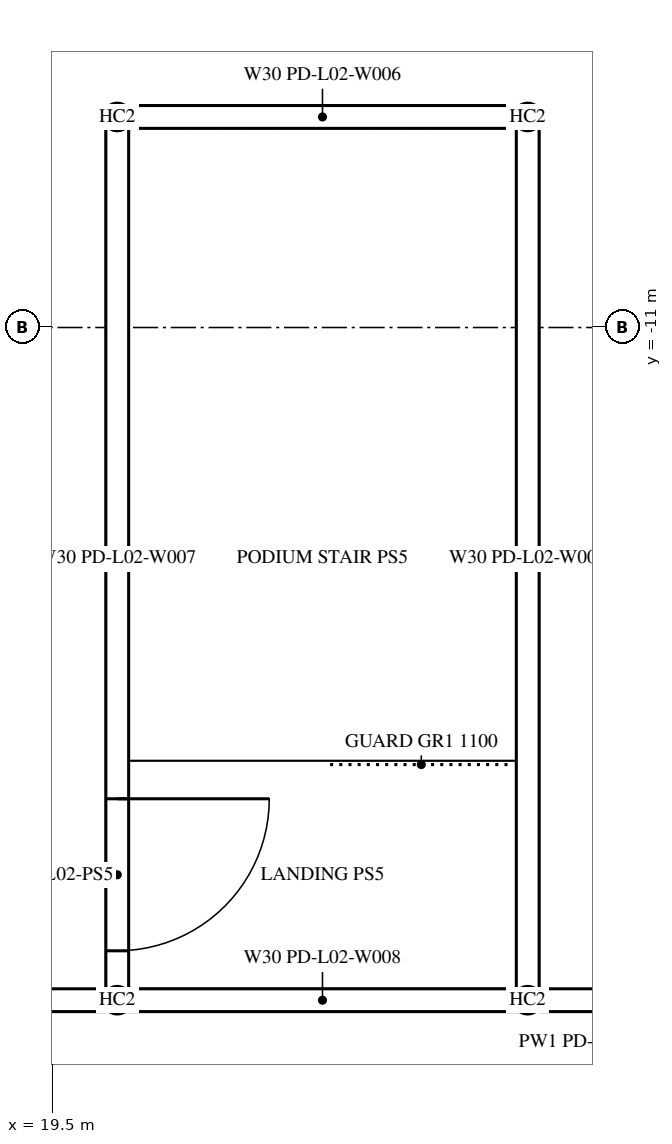
"""IFC4 building model, lengths in metres.
Left out: names, types, materials, properties, quantities, classifications, styles, units other than length and angle.
Written with IfcOpenShell. Run it as: python <this file> out.ifc"""

import sys

from ifc_helpers import new_model, si_unit, direction, frame, frame_2d, origin, origin_2d, place, context, subcontext, project, spatial, rectangle, hollow_circle, extrude, element, fill, save


model = new_model("IFC4")
c1 = context("Model", 3, precision=1e-05, world=origin(), true_north=direction((0.0, 1.0)))
c2 = subcontext(c1, "Body", "Model", "MODEL_VIEW")
j1 = project(units=[si_unit("LENGTHUNIT", "METRE"), si_unit("PLANEANGLEUNIT", "RADIAN")], contexts=[c1])
p1 = place(None, origin())
s1 = spatial("IfcSite", under=j1, at=p1, CompositionType="ELEMENT")
p2 = place(p1, origin())
s2 = spatial("IfcBuilding", under=s1, at=p2, CompositionType="ELEMENT")
p3 = place(p2, frame((0.0, 0.0, 12.6)))
s3 = spatial("IfcBuildingStorey", under=s2, at=p3, CompositionType="ELEMENT", Elevation=12.6)
p4 = place(p3, frame((-20.2, -19.85, 0.0), z_axis=(0.0, 0.0, 1.0), x_axis=(1.0, 0.0, 0.0)))
e1 = element("IfcWall", 1, at=p4, inside=s3, PredefinedType="PARAPET", context=c2, shape_type="SweptSolid", body=[
    extrude(rectangle(XDim=40.4, YDim=0.3, at=frame_2d((20.2, 0.0))), origin(), (0.0, 0.0, 1.0), 1.1),
])
p5 = place(p3, frame((25.9, -19.85, 0.0), z_axis=(0.0, 0.0, 1.0), x_axis=(1.0, 0.0, 0.0)))
e2 = element("IfcWall", 2, at=p5, inside=s3, PredefinedType="PARAPET", context=c2, shape_type="SweptSolid", body=[
    extrude(rectangle(XDim=1.55, YDim=0.3, at=frame_2d((0.775, 0.0))), origin(), (0.0, 0.0, 1.0), 1.1),
])
for number, where, z_axis, x_axis in (
    (3, (20.35, -8.23, 0.0), (0.0, 0.0, 1.0), (1.0, 0.0, 0.0)),
    (4, (25.75, -8.23, 0.0), (0.0, 0.0, 1.0), (1.0, 0.0, 0.0)),
    (5, (20.35, -19.85, 0.0), (0.0, 0.0, 1.0), (1.0, 0.0, 0.0)),
    (6, (25.75, -19.85, 0.0), (0.0, 0.0, 1.0), (1.0, 0.0, 0.0)),
):
    element("IfcColumn", number, at=place(p3, frame(where, z_axis=z_axis, x_axis=x_axis)), inside=s3, PredefinedType="COLUMN", context=c2, shape_type="SweptSolid", body=[
        extrude(hollow_circle(Radius=0.162, WallThickness=0.012, at=origin_2d()), origin(), (0.0, 0.0, 1.0), 3.0),
    ])
for number, where, z_axis, x_axis in (
    (7, (20.411, -19.85, 0.0), (0.0, 0.0, 1.0), (1.0, 0.0, 0.0)),
    (8, (20.411, -8.23, 0.0), (0.0, 0.0, 1.0), (1.0, 0.0, 0.0)),
):
    element("IfcWall", number, at=place(p3, frame(where, z_axis=z_axis, x_axis=x_axis)), inside=s3, PredefinedType="SOLIDWALL", context=c2, shape_type="SweptSolid", body=[
        extrude(rectangle(XDim=5.278, YDim=0.3, at=frame_2d((2.639, 0.0))), origin(), (0.0, 0.0, 1.0), 2.23),
    ])
p6 = place(p3, frame((20.35, -8.291, 0.0), z_axis=(0.0, 0.0, 1.0), x_axis=(0.0, -1.0, 0.0)))
e9 = element("IfcWall", 9, at=p6, inside=s3, PredefinedType="SOLIDWALL", context=c2, shape_type="SweptSolid", body=[
    extrude(rectangle(XDim=11.498, YDim=0.3, at=frame_2d((5.749, 0.0))), origin(), (0.0, 0.0, 1.0), 2.23),
])
p7 = place(p6, frame((8.909, 0.0, 0.0)))
e10 = element("IfcOpeningElement", 10, at=p7, cuts=e9, PredefinedType="OPENING", context=c2, shape_type="SweptSolid", body=[
    extrude(rectangle(XDim=2.0, YDim=2.2, at=frame_2d((1.0, 1.1))), frame((0.0, 0.16, 0.0), z_axis=(0.0, -1.0, 0.0), x_axis=(1.0, 0.0, 0.0)), (0.0, 0.0, 1.0), 0.32),
])
p8 = place(p3, frame((25.75, -8.291, 0.0), z_axis=(0.0, 0.0, 1.0), x_axis=(0.0, -1.0, 0.0)))
e11 = element("IfcWall", 11, at=p8, inside=s3, PredefinedType="SOLIDWALL", context=c2, shape_type="SweptSolid", body=[
    extrude(rectangle(XDim=11.498, YDim=0.3, at=frame_2d((5.749, 0.0))), origin(), (0.0, 0.0, 1.0), 2.23),
])
p9 = place(p7, origin())
e12 = element("IfcDoor", 12, at=p9, inside=s3, OperationType="DOUBLE_DOOR_SINGLE_SWING", PredefinedType="DOOR", context=c2, shape_type="SweptSolid", body=[
    extrude(rectangle(XDim=2.0, YDim=2.2, at=frame_2d((1.0, 1.1))), frame((0.0, 0.025, 0.0), z_axis=(0.0, -1.0, 0.0), x_axis=(1.0, 0.0, 0.0)), (0.0, 0.0, 1.0), 0.05),
])
fill(e10, e12)
save(model, sys.argv[1])
